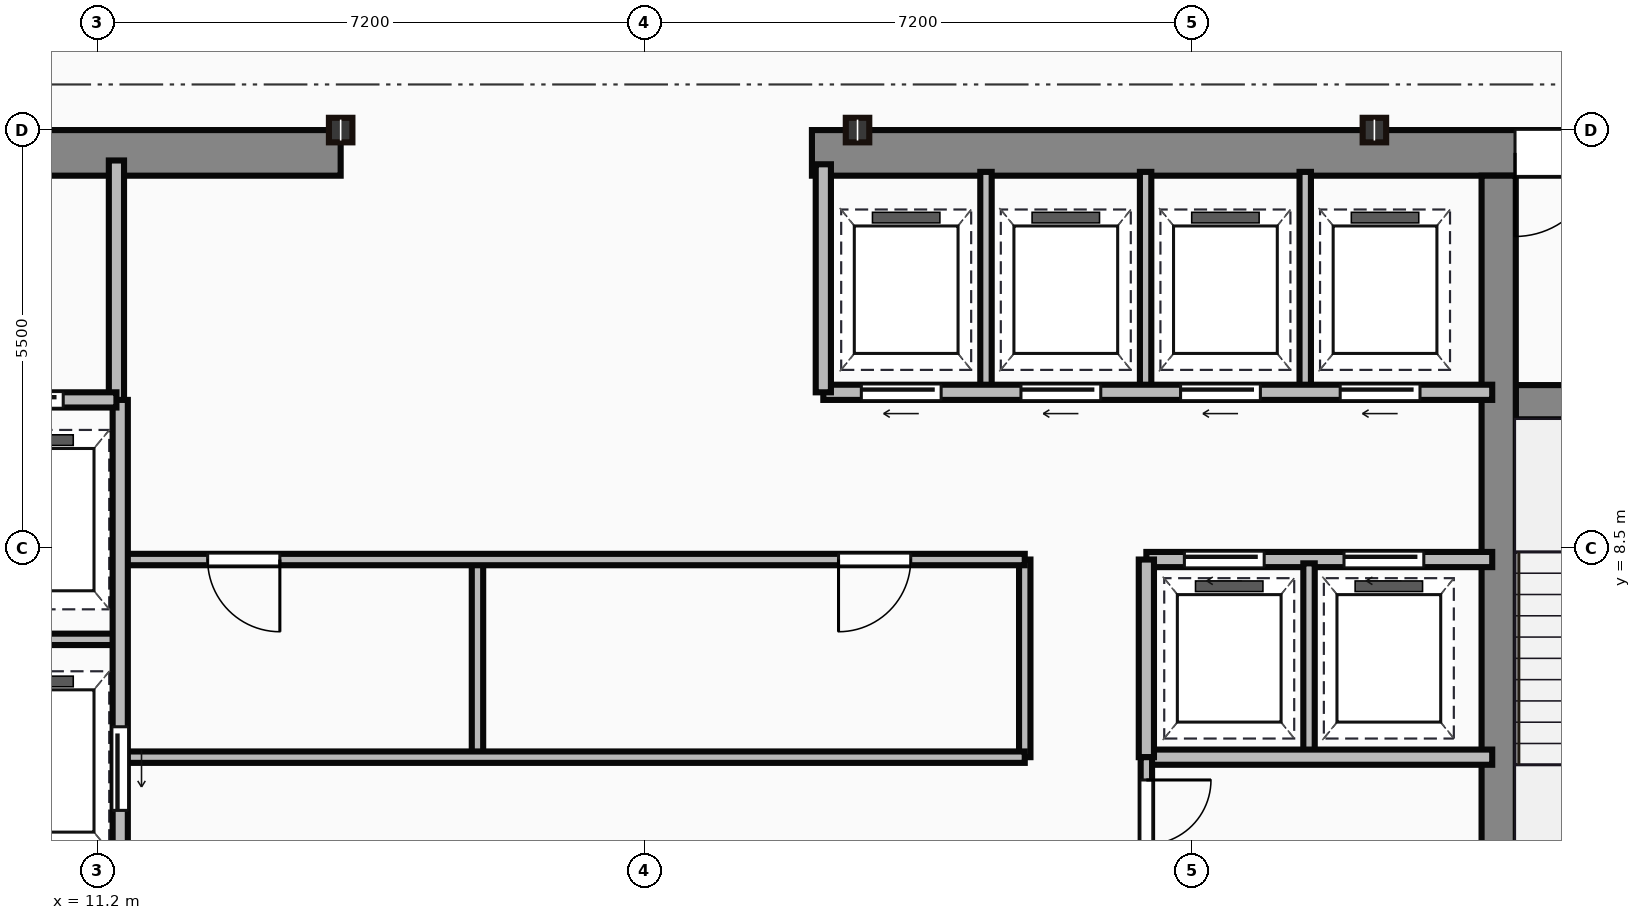
"""IFC4 building model, lengths in metres.
Left out: names, types, materials, properties, quantities, classifications, styles, units other than length and angle.
Written with IfcOpenShell. Run it as: python <this file> out.ifc"""

import sys

from ifc_helpers import new_model, si_unit, direction, frame, frame_2d, origin, origin_2d, place, context, subcontext, project, spatial, rectangle, i_section, extrude, source, transform, mapped, element, fill, save


model = new_model("IFC4")
c1 = context("Model", 3, precision=1e-05, world=origin(), true_north=direction((0.0, 1.0)))
c2 = subcontext(c1, "Body", "Model", "MODEL_VIEW")
j1 = project(units=[si_unit("LENGTHUNIT", "METRE"), si_unit("PLANEANGLEUNIT", "RADIAN")], contexts=[c1])
p1 = place(None, origin())
s1 = spatial("IfcSite", under=j1, at=p1, CompositionType="ELEMENT")
p2 = place(p1, origin())
s2 = spatial("IfcBuilding", under=s1, at=p2, CompositionType="ELEMENT")
p3 = place(p2, frame((0.0, 0.0, 262.45)))
s3 = spatial("IfcBuildingStorey", under=s2, at=p3, CompositionType="ELEMENT", Elevation=262.45)
m1 = source(origin(), c2, "Body", "SweptSolid", [
    extrude(rectangle(XDim=9.1, YDim=0.6, at=frame_2d((4.55, 0.0))), origin(), (0.0, 0.0, 1.0), 3.65),
])
p4 = place(p3, frame((5.3, 13.7, 0.0), z_axis=(0.0, 0.0, 1.0), x_axis=(1.0, 0.0, 0.0)))
e1 = element("IfcWall", 1, at=p4, inside=s3, PredefinedType="SHEAR", context=c2, shape_type="MappedRepresentation", body=[
    mapped(m1, transform((0.0, 0.0, 0.0))),
])
p5 = place(p4, frame((4.1, 0.0, 0.0)))
e2 = element("IfcOpeningElement", 2, at=p5, cuts=e1, PredefinedType="OPENING", context=c2, shape_type="SweptSolid", body=[
    extrude(rectangle(XDim=1.1, YDim=2.15, at=frame_2d((0.55, 1.075))), frame((0.0, 0.31, 0.0), z_axis=(0.0, -1.0, 0.0), x_axis=(1.0, 0.0, 0.0)), (0.0, 0.0, 1.0), 0.62),
])
m2 = source(origin(), c2, "Body", "SweptSolid", [
    extrude(rectangle(XDim=12.6, YDim=0.6, at=frame_2d((6.3, 0.0))), origin(), (0.0, 0.0, 1.0), 3.65),
])
p6 = place(p3, frame((20.6, 13.7, 0.0), z_axis=(0.0, 0.0, 1.0), x_axis=(1.0, 0.0, 0.0)))
e3 = element("IfcWall", 3, at=p6, inside=s3, PredefinedType="SHEAR", context=c2, shape_type="MappedRepresentation", body=[
    mapped(m2, transform((0.0, 0.0, 0.0))),
])
p7 = place(p6, frame((9.25, 0.0, 0.0)))
e4 = element("IfcOpeningElement", 4, at=p7, cuts=e3, PredefinedType="OPENING", context=c2, shape_type="SweptSolid", body=[
    extrude(rectangle(XDim=1.1, YDim=2.15, at=frame_2d((0.55, 1.075))), frame((0.0, 0.31, 0.0), z_axis=(0.0, -1.0, 0.0), x_axis=(1.0, 0.0, 0.0)), (0.0, 0.0, 1.0), 0.62),
])
m3 = source(origin(), c2, "Body", "SweptSolid", [
    extrude(rectangle(XDim=12.5, YDim=0.45, at=frame_2d((6.25, 0.0))), origin(), (0.0, 0.0, 1.0), 3.65),
])
p8 = place(p3, frame((29.635, 0.9, 0.0), z_axis=(0.0, 0.0, 1.0), x_axis=(0.0, 1.0, 0.0)))
e5 = element("IfcWall", 5, at=p8, inside=s3, PredefinedType="SHEAR", context=c2, shape_type="MappedRepresentation", body=[
    mapped(m3, transform((0.0, 0.0, 0.0))),
])
m4 = source(origin(), c2, "Body", "SweptSolid", [
    extrude(rectangle(XDim=3.39, YDim=0.45, at=frame_2d((1.695, 0.0))), origin(), (0.0, 0.0, 1.0), 3.65),
])
p9 = place(p3, frame((29.86, 10.42, 0.0), z_axis=(0.0, 0.0, 1.0), x_axis=(1.0, 0.0, 0.0)))
e6 = element("IfcWall", 6, at=p9, inside=s3, PredefinedType="SHEAR", context=c2, shape_type="MappedRepresentation", body=[
    mapped(m4, transform((0.0, 0.0, 0.0))),
])
p10 = place(p9, frame((1.1, 0.0, 0.0)))
e7 = element("IfcOpeningElement", 7, at=p10, cuts=e6, PredefinedType="OPENING", context=c2, shape_type="SweptSolid", body=[
    extrude(rectangle(XDim=1.1, YDim=2.15, at=frame_2d((0.55, 1.075))), frame((0.0, 0.235, 0.0), z_axis=(0.0, -1.0, 0.0), x_axis=(1.0, 0.0, 0.0)), (0.0, 0.0, 1.0), 0.47),
])
m5 = source(origin(), c2, "Body", "SweptSolid", [
    extrude(i_section(OverallWidth=0.309, OverallDepth=0.323, WebThickness=0.014, FlangeThickness=0.023, at=origin_2d()), origin(), (0.0, 0.0, 1.0), 3.65),
])
for number, where, z_axis, x_axis in (
    (8, (14.4, 14.0, 0.0), (0.0, 0.0, 1.0), (1.0, 0.0, 0.0)),
    (9, (21.2, 14.0, 0.0), (0.0, 0.0, 1.0), (1.0, 0.0, 0.0)),
    (10, (28.0, 14.0, 0.0), (0.0, 0.0, 1.0), (1.0, 0.0, 0.0)),
):
    element("IfcColumn", number, at=place(p3, frame(where, z_axis=z_axis, x_axis=x_axis)), inside=s3, PredefinedType="COLUMN", context=c2, shape_type="MappedRepresentation", body=[
        mapped(m5, transform((0.0, 0.0, 0.0))),
    ])
m6 = source(origin(), c2, "Body", "SweptSolid", [
    extrude(rectangle(XDim=3.18, YDim=0.2, at=frame_2d((1.59, 0.0))), origin(), (0.0, 0.0, 1.0), 3.4),
])
p11 = place(p3, frame((11.45, 10.42, 0.0), z_axis=(0.0, 0.0, 1.0), x_axis=(0.0, 1.0, 0.0)))
e11 = element("IfcWall", 11, at=p11, inside=s3, PredefinedType="PARTITIONING", context=c2, shape_type="MappedRepresentation", body=[
    mapped(m6, transform((0.0, 0.0, 0.0))),
])
m7 = source(origin(), c2, "Body", "SweptSolid", [
    extrude(rectangle(XDim=2.35, YDim=0.2, at=frame_2d((1.175, 0.0))), origin(), (0.0, 0.0, 1.0), 3.4),
])
p12 = place(p3, frame((9.1, 10.45, 0.0), z_axis=(0.0, 0.0, 1.0), x_axis=(1.0, 0.0, 0.0)))
e12 = element("IfcWall", 12, at=p12, inside=s3, PredefinedType="PARTITIONING", context=c2, shape_type="MappedRepresentation", body=[
    mapped(m7, transform((0.0, 0.0, 0.0))),
])
p13 = place(p12, frame((0.55, 0.0, 0.0)))
e13 = element("IfcOpeningElement", 13, at=p13, cuts=e12, PredefinedType="OPENING", context=c2, shape_type="SweptSolid", body=[
    extrude(rectangle(XDim=1.1, YDim=2.15, at=frame_2d((0.55, 1.075))), frame((0.0, 0.11, 0.0), z_axis=(0.0, -1.0, 0.0), x_axis=(1.0, 0.0, 0.0)), (0.0, 0.0, 1.0), 0.22),
])
m8 = source(origin(), c2, "Body", "SweptSolid", [
    extrude(rectangle(XDim=9.6, YDim=0.2, at=frame_2d((4.8, 0.0))), origin(), (0.0, 0.0, 1.0), 3.4),
])
p14 = place(p3, frame((11.5, 0.85, 0.0), z_axis=(0.0, 0.0, 1.0), x_axis=(0.0, 1.0, 0.0)))
e14 = element("IfcWall", 14, at=p14, inside=s3, PredefinedType="PARTITIONING", context=c2, shape_type="MappedRepresentation", body=[
    mapped(m8, transform((0.0, 0.0, 0.0))),
])
p15 = place(p14, frame((4.2, 0.0, 0.0)))
e15 = element("IfcOpeningElement", 15, at=p15, cuts=e14, PredefinedType="OPENING", context=c2, shape_type="SweptSolid", body=[
    extrude(rectangle(XDim=1.1, YDim=2.15, at=frame_2d((0.55, 1.075))), frame((0.0, 0.11, 0.0), z_axis=(0.0, -1.0, 0.0), x_axis=(1.0, 0.0, 0.0)), (0.0, 0.0, 1.0), 0.22),
])
p16 = place(p14, frame((0.9, 0.0, 0.0)))
e16 = element("IfcOpeningElement", 16, at=p16, cuts=e14, PredefinedType="OPENING", context=c2, shape_type="SweptSolid", body=[
    extrude(rectangle(XDim=1.2, YDim=2.15, at=frame_2d((0.6, 1.075))), frame((0.0, 0.11, 0.0), z_axis=(0.0, -1.0, 0.0), x_axis=(1.0, 0.0, 0.0)), (0.0, 0.0, 1.0), 0.22),
])
m9 = source(origin(), c2, "Body", "SweptSolid", [
    extrude(rectangle(XDim=2.4, YDim=0.15, at=frame_2d((1.2, 0.0))), origin(), (0.0, 0.0, 1.0), 3.4),
])
p17 = place(p3, frame((9.1, 7.3, 0.0), z_axis=(0.0, 0.0, 1.0), x_axis=(1.0, 0.0, 0.0)))
e17 = element("IfcWall", 17, at=p17, inside=s3, PredefinedType="PARTITIONING", context=c2, shape_type="MappedRepresentation", body=[
    mapped(m9, transform((0.0, 0.0, 0.0))),
])
m10 = source(origin(), c2, "Body", "SweptSolid", [
    extrude(rectangle(XDim=11.85, YDim=0.15, at=frame_2d((5.925, 0.0))), origin(), (0.0, 0.0, 1.0), 3.4),
])
p18 = place(p3, frame((11.55, 5.75, 0.0), z_axis=(0.0, 0.0, 1.0), x_axis=(1.0, 0.0, 0.0)))
e18 = element("IfcWall", 18, at=p18, inside=s3, PredefinedType="PARTITIONING", context=c2, shape_type="MappedRepresentation", body=[
    mapped(m10, transform((0.0, 0.0, 0.0))),
])
p19 = place(p3, frame((11.55, 8.35, 0.0), z_axis=(0.0, 0.0, 1.0), x_axis=(1.0, 0.0, 0.0)))
e19 = element("IfcWall", 19, at=p19, inside=s3, PredefinedType="PARTITIONING", context=c2, shape_type="MappedRepresentation", body=[
    mapped(m10, transform((0.0, 0.0, 0.0))),
])
p20 = place(p19, frame((1.1, 0.0, 0.0)))
e20 = element("IfcOpeningElement", 20, at=p20, cuts=e19, PredefinedType="OPENING", context=c2, shape_type="SweptSolid", body=[
    extrude(rectangle(XDim=0.95, YDim=2.15, at=frame_2d((0.475, 1.075))), frame((0.0, 0.085, 0.0), z_axis=(0.0, -1.0, 0.0), x_axis=(1.0, 0.0, 0.0)), (0.0, 0.0, 1.0), 0.17),
])
p21 = place(p19, frame((9.4, 0.0, 0.0)))
e21 = element("IfcOpeningElement", 21, at=p21, cuts=e19, PredefinedType="OPENING", context=c2, shape_type="SweptSolid", body=[
    extrude(rectangle(XDim=0.95, YDim=2.15, at=frame_2d((0.475, 1.075))), frame((0.0, 0.085, 0.0), z_axis=(0.0, -1.0, 0.0), x_axis=(1.0, 0.0, 0.0)), (0.0, 0.0, 1.0), 0.17),
])
m11 = source(origin(), c2, "Body", "SweptSolid", [
    extrude(rectangle(XDim=2.6, YDim=0.15, at=frame_2d((1.3, 0.0))), origin(), (0.0, 0.0, 1.0), 3.4),
])
p22 = place(p3, frame((23.4, 5.75, 0.0), z_axis=(0.0, 0.0, 1.0), x_axis=(0.0, 1.0, 0.0)))
e22 = element("IfcWall", 22, at=p22, inside=s3, PredefinedType="PARTITIONING", context=c2, shape_type="MappedRepresentation", body=[
    mapped(m11, transform((0.0, 0.0, 0.0))),
])
m12 = source(origin(), c2, "Body", "SweptSolid", [
    extrude(rectangle(XDim=2.5, YDim=0.15, at=frame_2d((1.25, 0.0))), origin(), (0.0, 0.0, 1.0), 3.4),
])
p23 = place(p3, frame((16.2, 5.8, 0.0), z_axis=(0.0, 0.0, 1.0), x_axis=(0.0, 1.0, 0.0)))
e23 = element("IfcWall", 23, at=p23, inside=s3, PredefinedType="PARTITIONING", context=c2, shape_type="MappedRepresentation", body=[
    mapped(m12, transform((0.0, 0.0, 0.0))),
])
m13 = source(origin(), c2, "Body", "SweptSolid", [
    extrude(rectangle(XDim=8.8, YDim=0.2, at=frame_2d((4.4, 0.0))), origin(), (0.0, 0.0, 1.0), 3.4),
])
p24 = place(p3, frame((20.75, 10.55, 0.0), z_axis=(0.0, 0.0, 1.0), x_axis=(1.0, 0.0, 0.0)))
e24 = element("IfcWall", 24, at=p24, inside=s3, PredefinedType="PARTITIONING", context=c2, shape_type="MappedRepresentation", body=[
    mapped(m13, transform((0.0, 0.0, 0.0))),
])
p25 = place(p24, frame((0.5, 0.0, 0.0)))
e25 = element("IfcOpeningElement", 25, at=p25, cuts=e24, PredefinedType="OPENING", context=c2, shape_type="SweptSolid", body=[
    extrude(rectangle(XDim=1.05, YDim=2.15, at=frame_2d((0.525, 1.075))), frame((0.0, 0.11, 0.0), z_axis=(0.0, -1.0, 0.0), x_axis=(1.0, 0.0, 0.0)), (0.0, 0.0, 1.0), 0.22),
])
p26 = place(p24, frame((2.6, 0.0, 0.0)))
e26 = element("IfcOpeningElement", 26, at=p26, cuts=e24, PredefinedType="OPENING", context=c2, shape_type="SweptSolid", body=[
    extrude(rectangle(XDim=1.05, YDim=2.15, at=frame_2d((0.525, 1.075))), frame((0.0, 0.11, 0.0), z_axis=(0.0, -1.0, 0.0), x_axis=(1.0, 0.0, 0.0)), (0.0, 0.0, 1.0), 0.22),
])
p27 = place(p24, frame((4.7, 0.0, 0.0)))
e27 = element("IfcOpeningElement", 27, at=p27, cuts=e24, PredefinedType="OPENING", context=c2, shape_type="SweptSolid", body=[
    extrude(rectangle(XDim=1.05, YDim=2.15, at=frame_2d((0.525, 1.075))), frame((0.0, 0.11, 0.0), z_axis=(0.0, -1.0, 0.0), x_axis=(1.0, 0.0, 0.0)), (0.0, 0.0, 1.0), 0.22),
])
p28 = place(p24, frame((6.8, 0.0, 0.0)))
e28 = element("IfcOpeningElement", 28, at=p28, cuts=e24, PredefinedType="OPENING", context=c2, shape_type="SweptSolid", body=[
    extrude(rectangle(XDim=1.05, YDim=2.15, at=frame_2d((0.525, 1.075))), frame((0.0, 0.11, 0.0), z_axis=(0.0, -1.0, 0.0), x_axis=(1.0, 0.0, 0.0)), (0.0, 0.0, 1.0), 0.22),
])
m14 = source(origin(), c2, "Body", "SweptSolid", [
    extrude(rectangle(XDim=3.0, YDim=0.2, at=frame_2d((1.5, 0.0))), origin(), (0.0, 0.0, 1.0), 3.4),
])
p29 = place(p3, frame((20.75, 10.55, 0.0), z_axis=(0.0, 0.0, 1.0), x_axis=(0.0, 1.0, 0.0)))
e29 = element("IfcWall", 29, at=p29, inside=s3, PredefinedType="PARTITIONING", context=c2, shape_type="MappedRepresentation", body=[
    mapped(m14, transform((0.0, 0.0, 0.0))),
])
m15 = source(origin(), c2, "Body", "SweptSolid", [
    extrude(rectangle(XDim=2.85, YDim=0.15, at=frame_2d((1.425, 0.0))), origin(), (0.0, 0.0, 1.0), 3.4),
])
for number, where, z_axis, x_axis in (
    (30, (22.89, 10.6, 0.0), (0.0, 0.0, 1.0), (0.0, 1.0, 0.0)),
    (31, (24.99, 10.6, 0.0), (0.0, 0.0, 1.0), (0.0, 1.0, 0.0)),
    (32, (27.09, 10.6, 0.0), (0.0, 0.0, 1.0), (0.0, 1.0, 0.0)),
):
    element("IfcWall", number, at=place(p3, frame(where, z_axis=z_axis, x_axis=x_axis)), inside=s3, PredefinedType="PARTITIONING", context=c2, shape_type="MappedRepresentation", body=[
        mapped(m15, transform((0.0, 0.0, 0.0))),
    ])
m16 = source(origin(), c2, "Body", "SweptSolid", [
    extrude(rectangle(XDim=4.55, YDim=0.2, at=frame_2d((2.275, 0.0))), origin(), (0.0, 0.0, 1.0), 3.4),
])
p30 = place(p3, frame((25.0, 8.35, 0.0), z_axis=(0.0, 0.0, 1.0), x_axis=(1.0, 0.0, 0.0)))
e33 = element("IfcWall", 33, at=p30, inside=s3, PredefinedType="PARTITIONING", context=c2, shape_type="MappedRepresentation", body=[
    mapped(m16, transform((0.0, 0.0, 0.0))),
])
p31 = place(p30, frame((0.5, 0.0, 0.0)))
e34 = element("IfcOpeningElement", 34, at=p31, cuts=e33, PredefinedType="OPENING", context=c2, shape_type="SweptSolid", body=[
    extrude(rectangle(XDim=1.05, YDim=2.15, at=frame_2d((0.525, 1.075))), frame((0.0, 0.11, 0.0), z_axis=(0.0, -1.0, 0.0), x_axis=(1.0, 0.0, 0.0)), (0.0, 0.0, 1.0), 0.22),
])
p32 = place(p30, frame((2.6, 0.0, 0.0)))
e35 = element("IfcOpeningElement", 35, at=p32, cuts=e33, PredefinedType="OPENING", context=c2, shape_type="SweptSolid", body=[
    extrude(rectangle(XDim=1.05, YDim=2.15, at=frame_2d((0.525, 1.075))), frame((0.0, 0.11, 0.0), z_axis=(0.0, -1.0, 0.0), x_axis=(1.0, 0.0, 0.0)), (0.0, 0.0, 1.0), 0.22),
])
p33 = place(p3, frame((25.0, 5.75, 0.0), z_axis=(0.0, 0.0, 1.0), x_axis=(1.0, 0.0, 0.0)))
e36 = element("IfcWall", 36, at=p33, inside=s3, PredefinedType="PARTITIONING", context=c2, shape_type="MappedRepresentation", body=[
    mapped(m16, transform((0.0, 0.0, 0.0))),
])
m17 = source(origin(), c2, "Body", "SweptSolid", [
    extrude(rectangle(XDim=2.6, YDim=0.2, at=frame_2d((1.3, 0.0))), origin(), (0.0, 0.0, 1.0), 3.4),
])
p34 = place(p3, frame((25.0, 5.75, 0.0), z_axis=(0.0, 0.0, 1.0), x_axis=(0.0, 1.0, 0.0)))
e37 = element("IfcWall", 37, at=p34, inside=s3, PredefinedType="PARTITIONING", context=c2, shape_type="MappedRepresentation", body=[
    mapped(m17, transform((0.0, 0.0, 0.0))),
])
p35 = place(p3, frame((27.14, 5.8, 0.0), z_axis=(0.0, 0.0, 1.0), x_axis=(0.0, 1.0, 0.0)))
e38 = element("IfcWall", 38, at=p35, inside=s3, PredefinedType="PARTITIONING", context=c2, shape_type="MappedRepresentation", body=[
    mapped(m12, transform((0.0, 0.0, 0.0))),
])
m18 = source(origin(), c2, "Body", "SweptSolid", [
    extrude(rectangle(XDim=4.9, YDim=0.15, at=frame_2d((2.45, 0.0))), origin(), (0.0, 0.0, 1.0), 3.4),
])
p36 = place(p3, frame((25.0, 0.85, 0.0), z_axis=(0.0, 0.0, 1.0), x_axis=(0.0, 1.0, 0.0)))
e39 = element("IfcWall", 39, at=p36, inside=s3, PredefinedType="PARTITIONING", context=c2, shape_type="MappedRepresentation", body=[
    mapped(m18, transform((0.0, 0.0, 0.0))),
])
p37 = place(p36, frame((2.0, 0.0, 0.0)))
e40 = element("IfcOpeningElement", 40, at=p37, cuts=e39, PredefinedType="OPENING", context=c2, shape_type="SweptSolid", body=[
    extrude(rectangle(XDim=0.95, YDim=2.15, at=frame_2d((0.475, 1.075))), frame((0.0, 0.085, 0.0), z_axis=(0.0, -1.0, 0.0), x_axis=(1.0, 0.0, 0.0)), (0.0, 0.0, 1.0), 0.17),
])
p38 = place(p36, frame((3.75, 0.0, 0.0)))
e41 = element("IfcOpeningElement", 41, at=p38, cuts=e39, PredefinedType="OPENING", context=c2, shape_type="SweptSolid", body=[
    extrude(rectangle(XDim=0.85, YDim=2.15, at=frame_2d((0.425, 1.075))), frame((0.0, 0.085, 0.0), z_axis=(0.0, -1.0, 0.0), x_axis=(1.0, 0.0, 0.0)), (0.0, 0.0, 1.0), 0.17),
])
m19 = source(origin(), c2, "Body", "SweptSolid", [
    extrude(rectangle(XDim=1.1, YDim=2.15, at=frame_2d((0.55, 1.075))), frame((0.0, 0.025, 0.0), z_axis=(0.0, -1.0, 0.0), x_axis=(1.0, 0.0, 0.0)), (0.0, 0.0, 1.0), 0.05),
])
p39 = place(p7, origin())
e42 = element("IfcDoor", 42, at=p39, inside=s3, OperationType="SINGLE_SWING_LEFT", PredefinedType="DOOR", context=c2, shape_type="MappedRepresentation", body=[
    mapped(m19, transform((0.0, 0.0, 0.0))),
])
fill(e4, e42)
p40 = place(p13, origin())
e43 = element("IfcDoor", 43, at=p40, inside=s3, OperationType="SLIDING_TO_LEFT", PredefinedType="DOOR", context=c2, shape_type="MappedRepresentation", body=[
    mapped(m19, transform((0.0, 0.0, 0.0))),
])
fill(e13, e43)
p41 = place(p15, frame((1.1, 0.0, 0.0), z_axis=(0.0, 0.0, 1.0), x_axis=(-1.0, 0.0, 0.0)))
e44 = element("IfcDoor", 44, at=p41, inside=s3, OperationType="SLIDING_TO_LEFT", PredefinedType="DOOR", context=c2, shape_type="MappedRepresentation", body=[
    mapped(m19, transform((0.0, 0.0, 0.0))),
])
fill(e15, e44)
m20 = source(origin(), c2, "Body", "SweptSolid", [
    extrude(rectangle(XDim=0.95, YDim=2.15, at=frame_2d((0.475, 1.075))), frame((0.0, 0.025, 0.0), z_axis=(0.0, -1.0, 0.0), x_axis=(1.0, 0.0, 0.0)), (0.0, 0.0, 1.0), 0.05),
])
p42 = place(p20, origin())
e45 = element("IfcDoor", 45, at=p42, inside=s3, OperationType="SINGLE_SWING_RIGHT", PredefinedType="DOOR", context=c2, shape_type="MappedRepresentation", body=[
    mapped(m20, transform((0.0, 0.0, 0.0))),
])
fill(e20, e45)
p43 = place(p21, origin())
e46 = element("IfcDoor", 46, at=p43, inside=s3, OperationType="SINGLE_SWING_LEFT", PredefinedType="DOOR", context=c2, shape_type="MappedRepresentation", body=[
    mapped(m20, transform((0.0, 0.0, 0.0))),
])
fill(e21, e46)
m21 = source(origin(), c2, "Body", "SweptSolid", [
    extrude(rectangle(XDim=1.05, YDim=2.15, at=frame_2d((0.525, 1.075))), frame((0.0, 0.025, 0.0), z_axis=(0.0, -1.0, 0.0), x_axis=(1.0, 0.0, 0.0)), (0.0, 0.0, 1.0), 0.05),
])
p44 = place(p25, frame((1.05, 0.0, 0.0), z_axis=(0.0, 0.0, 1.0), x_axis=(-1.0, 0.0, 0.0)))
e47 = element("IfcDoor", 47, at=p44, inside=s3, OperationType="SLIDING_TO_LEFT", PredefinedType="DOOR", context=c2, shape_type="MappedRepresentation", body=[
    mapped(m21, transform((0.0, 0.0, 0.0))),
])
fill(e25, e47)
p45 = place(p26, frame((1.05, 0.0, 0.0), z_axis=(0.0, 0.0, 1.0), x_axis=(-1.0, 0.0, 0.0)))
e48 = element("IfcDoor", 48, at=p45, inside=s3, OperationType="SLIDING_TO_LEFT", PredefinedType="DOOR", context=c2, shape_type="MappedRepresentation", body=[
    mapped(m21, transform((0.0, 0.0, 0.0))),
])
fill(e26, e48)
p46 = place(p27, frame((1.05, 0.0, 0.0), z_axis=(0.0, 0.0, 1.0), x_axis=(-1.0, 0.0, 0.0)))
e49 = element("IfcDoor", 49, at=p46, inside=s3, OperationType="SLIDING_TO_LEFT", PredefinedType="DOOR", context=c2, shape_type="MappedRepresentation", body=[
    mapped(m21, transform((0.0, 0.0, 0.0))),
])
fill(e27, e49)
p47 = place(p28, frame((1.05, 0.0, 0.0), z_axis=(0.0, 0.0, 1.0), x_axis=(-1.0, 0.0, 0.0)))
e50 = element("IfcDoor", 50, at=p47, inside=s3, OperationType="SLIDING_TO_LEFT", PredefinedType="DOOR", context=c2, shape_type="MappedRepresentation", body=[
    mapped(m21, transform((0.0, 0.0, 0.0))),
])
fill(e28, e50)
p48 = place(p31, origin())
e51 = element("IfcDoor", 51, at=p48, inside=s3, OperationType="SLIDING_TO_LEFT", PredefinedType="DOOR", context=c2, shape_type="MappedRepresentation", body=[
    mapped(m21, transform((0.0, 0.0, 0.0))),
])
fill(e34, e51)
p49 = place(p32, origin())
e52 = element("IfcDoor", 52, at=p49, inside=s3, OperationType="SLIDING_TO_LEFT", PredefinedType="DOOR", context=c2, shape_type="MappedRepresentation", body=[
    mapped(m21, transform((0.0, 0.0, 0.0))),
])
fill(e35, e52)
m22 = source(origin(), c2, "Body", "SweptSolid", [
    extrude(rectangle(XDim=0.85, YDim=2.15, at=frame_2d((0.425, 1.075))), frame((0.0, 0.025, 0.0), z_axis=(0.0, -1.0, 0.0), x_axis=(1.0, 0.0, 0.0)), (0.0, 0.0, 1.0), 0.05),
])
p50 = place(p38, origin())
e53 = element("IfcDoor", 53, at=p50, inside=s3, OperationType="SINGLE_SWING_RIGHT", PredefinedType="DOOR", context=c2, shape_type="MappedRepresentation", body=[
    mapped(m22, transform((0.0, 0.0, 0.0))),
])
fill(e41, e53)
save(model, sys.argv[1])
